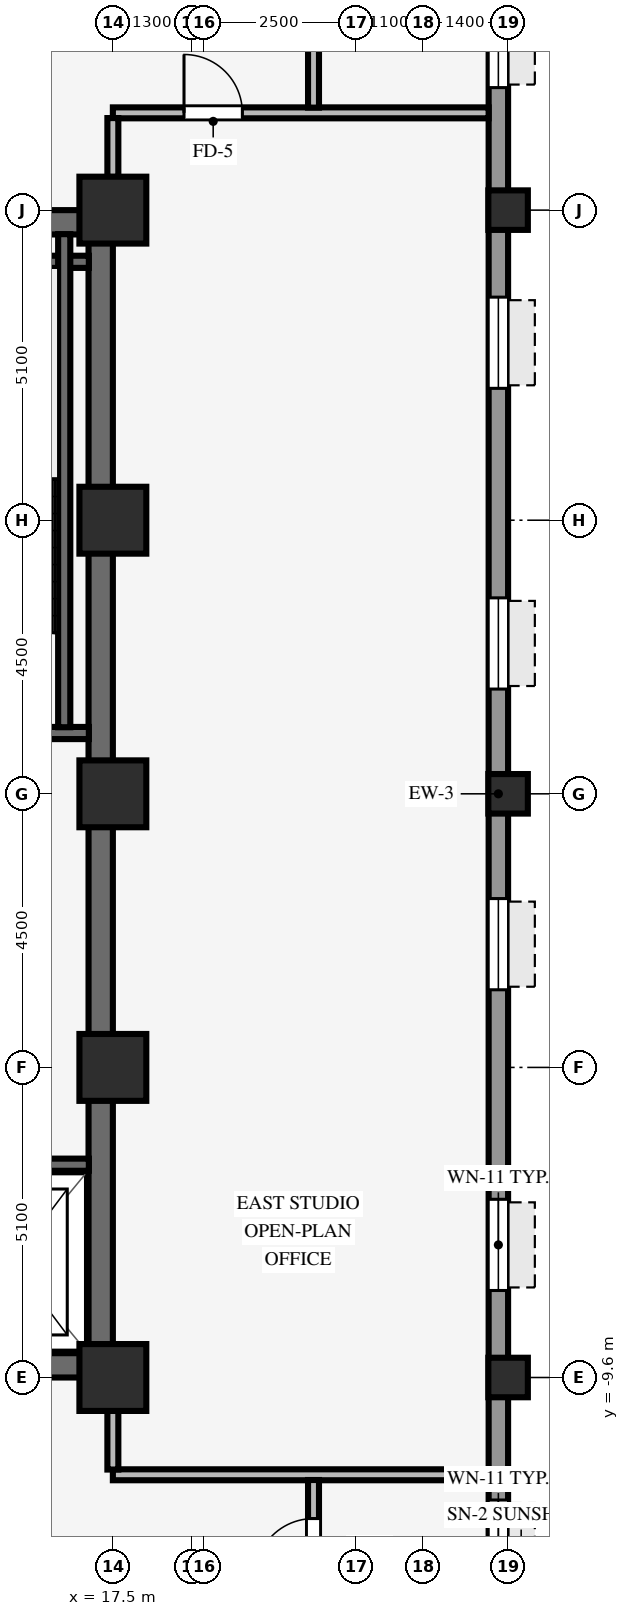
"""IFC4 building model, lengths in metres.
Left out: names, types, materials, properties, quantities, classifications, styles, units other than length and angle.
Written with IfcOpenShell. Run it as: python <this file> out.ifc"""

import sys

from ifc_helpers import new_model, si_unit, direction, frame, frame_2d, origin, origin_2d, place, context, subcontext, project, spatial, rectangle, hollow_rectangle, extrude, source, transform, mapped, element, fill, save


model = new_model("IFC4")
c1 = context("Model", 3, precision=1e-05, world=origin(), true_north=direction((0.0, 1.0)))
c2 = subcontext(c1, "Body", "Model", "MODEL_VIEW")
j1 = project(units=[si_unit("LENGTHUNIT", "METRE"), si_unit("PLANEANGLEUNIT", "RADIAN")], contexts=[c1])
p1 = place(None, origin())
s1 = spatial("IfcSite", under=j1, at=p1, CompositionType="ELEMENT")
p2 = place(p1, origin())
s2 = spatial("IfcBuilding", under=s1, at=p2, CompositionType="ELEMENT")
p3 = place(p2, frame((0.0, 0.0, 98.3)))
s3 = spatial("IfcBuildingStorey", under=s2, at=p3, CompositionType="ELEMENT", Elevation=98.3)
for number, where, z_axis, x_axis in (
    (1, (9.0, -9.4, 0.0), (0.0, 0.0, 1.0), (1.0, 0.0, 0.0)),
    (2, (9.0, 9.4, 0.0), (0.0, 0.0, 1.0), (1.0, 0.0, 0.0)),
):
    element("IfcWall", number, at=place(p3, frame(where, z_axis=z_axis, x_axis=x_axis)), inside=s3, PredefinedType="SHEAR", context=c2, shape_type="SweptSolid", body=[
        extrude(rectangle(XDim=8.5, YDim=0.4, at=frame_2d((4.25, 0.0))), origin(), (0.0, 0.0, 1.0), 3.37),
    ])
p4 = place(p3, frame((17.3, -9.205, 0.0), z_axis=(0.0, 0.0, 1.0), x_axis=(0.0, 1.0, 0.0)))
e3 = element("IfcWall", 3, at=p4, inside=s3, PredefinedType="SHEAR", context=c2, shape_type="SweptSolid", body=[
    extrude(rectangle(XDim=18.41, YDim=0.4, at=frame_2d((9.205, 0.0))), origin(), (0.0, 0.0, 1.0), 3.37),
])
for number, where, z_axis, x_axis in (
    (4, (17.5, -9.6, 0.0), (0.0, 0.0, 1.0), (1.0, 0.0, 0.0)),
    (5, (17.5, -4.5, 0.0), (0.0, 0.0, 1.0), (1.0, 0.0, 0.0)),
    (6, (17.5, 4.5, 0.0), (0.0, 0.0, 1.0), (1.0, 0.0, 0.0)),
    (7, (17.5, 9.6, 0.0), (0.0, 0.0, 1.0), (1.0, 0.0, 0.0)),
    (8, (17.5, 0.0, 0.0), (0.0, 0.0, 1.0), (1.0, 0.0, 0.0)),
):
    element("IfcColumn", number, at=place(p3, frame(where, z_axis=z_axis, x_axis=x_axis)), inside=s3, PredefinedType="COLUMN", context=c2, shape_type="SweptSolid", body=[
        extrude(rectangle(XDim=1.1, YDim=1.1, at=origin_2d()), origin(), (0.0, 0.0, 1.0), 3.37),
    ])
for number, where, z_axis, x_axis in (
    (9, (24.0, -9.6, 0.0), (0.0, 0.0, 1.0), (1.0, 0.0, 0.0)),
    (10, (24.0, 0.0, 0.0), (0.0, 0.0, 1.0), (1.0, 0.0, 0.0)),
    (11, (24.0, 9.6, 0.0), (0.0, 0.0, 1.0), (1.0, 0.0, 0.0)),
):
    element("IfcColumn", number, at=place(p3, frame(where, z_axis=z_axis, x_axis=x_axis)), inside=s3, PredefinedType="COLUMN", context=c2, shape_type="SweptSolid", body=[
        extrude(hollow_rectangle(XDim=0.65, YDim=0.65, WallThickness=0.04, InnerFilletRadius=0.04, OuterFilletRadius=0.08, at=origin_2d()), origin(), (0.0, 0.0, 1.0), 3.37),
    ])
p5 = place(p3, frame((23.84, -20.784, 0.0), z_axis=(0.0, 0.0, 1.0), x_axis=(0.0, 1.0, 0.0)))
e12 = element("IfcWall", 12, at=p5, inside=s3, PredefinedType="STANDARD", context=c2, shape_type="SweptSolid", body=[
    extrude(rectangle(XDim=41.568, YDim=0.32, at=frame_2d((20.784, 0.0))), origin(), (0.0, 0.0, 1.0), 2.705),
])
p6 = place(p5, frame((1.373, 0.0, 0.8)))
e13 = element("IfcOpeningElement", 13, at=p6, cuts=e12, PredefinedType="OPENING", context=c2, shape_type="SweptSolid", body=[
    extrude(rectangle(XDim=1.5, YDim=1.6, at=frame_2d((0.75, 0.8))), frame((0.0, 0.17, 0.0), z_axis=(0.0, -1.0, 0.0), x_axis=(1.0, 0.0, 0.0)), (0.0, 0.0, 1.0), 0.34),
])
p7 = place(p5, frame((7.669, 0.0, 0.8)))
e14 = element("IfcOpeningElement", 14, at=p7, cuts=e12, PredefinedType="OPENING", context=c2, shape_type="SweptSolid", body=[
    extrude(rectangle(XDim=1.5, YDim=1.6, at=frame_2d((0.75, 0.8))), frame((0.0, 0.17, 0.0), z_axis=(0.0, -1.0, 0.0), x_axis=(1.0, 0.0, 0.0)), (0.0, 0.0, 1.0), 0.34),
])
p8 = place(p5, frame((12.615, 0.0, 0.8)))
e15 = element("IfcOpeningElement", 15, at=p8, cuts=e12, PredefinedType="OPENING", context=c2, shape_type="SweptSolid", body=[
    extrude(rectangle(XDim=1.5, YDim=1.6, at=frame_2d((0.75, 0.8))), frame((0.0, 0.17, 0.0), z_axis=(0.0, -1.0, 0.0), x_axis=(1.0, 0.0, 0.0)), (0.0, 0.0, 1.0), 0.34),
])
p9 = place(p5, frame((17.561, 0.0, 0.8)))
e16 = element("IfcOpeningElement", 16, at=p9, cuts=e12, PredefinedType="OPENING", context=c2, shape_type="SweptSolid", body=[
    extrude(rectangle(XDim=1.5, YDim=1.6, at=frame_2d((0.75, 0.8))), frame((0.0, 0.17, 0.0), z_axis=(0.0, -1.0, 0.0), x_axis=(1.0, 0.0, 0.0)), (0.0, 0.0, 1.0), 0.34),
])
p10 = place(p5, frame((22.507, 0.0, 0.8)))
e17 = element("IfcOpeningElement", 17, at=p10, cuts=e12, PredefinedType="OPENING", context=c2, shape_type="SweptSolid", body=[
    extrude(rectangle(XDim=1.5, YDim=1.6, at=frame_2d((0.75, 0.8))), frame((0.0, 0.17, 0.0), z_axis=(0.0, -1.0, 0.0), x_axis=(1.0, 0.0, 0.0)), (0.0, 0.0, 1.0), 0.34),
])
p11 = place(p5, frame((27.453, 0.0, 0.8)))
e18 = element("IfcOpeningElement", 18, at=p11, cuts=e12, PredefinedType="OPENING", context=c2, shape_type="SweptSolid", body=[
    extrude(rectangle(XDim=1.5, YDim=1.6, at=frame_2d((0.75, 0.8))), frame((0.0, 0.17, 0.0), z_axis=(0.0, -1.0, 0.0), x_axis=(1.0, 0.0, 0.0)), (0.0, 0.0, 1.0), 0.34),
])
p12 = place(p5, frame((32.399, 0.0, 0.8)))
e19 = element("IfcOpeningElement", 19, at=p12, cuts=e12, PredefinedType="OPENING", context=c2, shape_type="SweptSolid", body=[
    extrude(rectangle(XDim=1.5, YDim=1.6, at=frame_2d((0.75, 0.8))), frame((0.0, 0.17, 0.0), z_axis=(0.0, -1.0, 0.0), x_axis=(1.0, 0.0, 0.0)), (0.0, 0.0, 1.0), 0.34),
])
p13 = place(p5, frame((38.695, 0.0, 0.8)))
e20 = element("IfcOpeningElement", 20, at=p13, cuts=e12, PredefinedType="OPENING", context=c2, shape_type="SweptSolid", body=[
    extrude(rectangle(XDim=1.5, YDim=1.6, at=frame_2d((0.75, 0.8))), frame((0.0, 0.17, 0.0), z_axis=(0.0, -1.0, 0.0), x_axis=(1.0, 0.0, 0.0)), (0.0, 0.0, 1.0), 0.34),
])
for number, where, z_axis, x_axis in (
    (21, (13.535, 1.0, 0.0), (0.0, 0.0, 1.0), (1.0, 0.0, 0.0)),
    (22, (13.535, 8.75, 0.0), (0.0, 0.0, 1.0), (1.0, 0.0, 0.0)),
):
    element("IfcWall", number, at=place(p3, frame(where, z_axis=z_axis, x_axis=x_axis)), inside=s3, PredefinedType="SHEAR", context=c2, shape_type="SweptSolid", body=[
        extrude(rectangle(XDim=3.57, YDim=0.2, at=frame_2d((1.785, 0.0))), origin(), (0.0, 0.0, 1.0), 3.37),
    ])
p14 = place(p3, frame((16.7, 1.095, 0.0), z_axis=(0.0, 0.0, 1.0), x_axis=(0.0, 1.0, 0.0)))
e23 = element("IfcWall", 23, at=p14, inside=s3, PredefinedType="SHEAR", context=c2, shape_type="SweptSolid", body=[
    extrude(rectangle(XDim=8.11, YDim=0.2, at=frame_2d((4.055, 0.0))), origin(), (0.0, 0.0, 1.0), 3.37),
])
p15 = place(p3, frame((14.645, -6.1, 0.0), z_axis=(0.0, 0.0, 1.0), x_axis=(1.0, 0.0, 0.0)))
e24 = element("IfcWall", 24, at=p15, inside=s3, PredefinedType="SHEAR", context=c2, shape_type="SweptSolid", body=[
    extrude(rectangle(XDim=2.46, YDim=0.2, at=frame_2d((1.23, 0.0))), origin(), (0.0, 0.0, 1.0), 3.37),
])
p16 = place(p3, frame((17.5, -11.2, 0.0), z_axis=(0.0, 0.0, 1.0), x_axis=(1.0, 0.0, 0.0)))
e25 = element("IfcWall", 25, at=p16, inside=s3, PredefinedType="PARTITIONING", context=c2, shape_type="SweptSolid", body=[
    extrude(rectangle(XDim=6.18, YDim=0.18, at=frame_2d((3.09, 0.0))), origin(), (0.0, 0.0, 1.0), 3.36),
])
p17 = place(p3, frame((17.5, 11.2, 0.0), z_axis=(0.0, 0.0, 1.0), x_axis=(1.0, 0.0, 0.0)))
e26 = element("IfcWall", 26, at=p17, inside=s3, PredefinedType="PARTITIONING", context=c2, shape_type="SweptSolid", body=[
    extrude(rectangle(XDim=6.18, YDim=0.18, at=frame_2d((3.09, 0.0))), origin(), (0.0, 0.0, 1.0), 3.36),
])
p18 = place(p17, frame((1.17, 0.0, 0.0)))
e27 = element("IfcOpeningElement", 27, at=p18, cuts=e26, PredefinedType="OPENING", context=c2, shape_type="SweptSolid", body=[
    extrude(rectangle(XDim=0.96, YDim=2.1, at=frame_2d((0.48, 1.05))), frame((0.0, 0.1, 0.0), z_axis=(0.0, -1.0, 0.0), x_axis=(1.0, 0.0, 0.0)), (0.0, 0.0, 1.0), 0.2),
])
for number, where, z_axis, x_axis in (
    (28, (17.5, -11.114, 0.0), (0.0, 0.0, 1.0), (0.0, 1.0, 0.0)),
    (29, (17.5, 10.146, 0.0), (0.0, 0.0, 1.0), (0.0, 1.0, 0.0)),
):
    element("IfcWall", number, at=place(p3, frame(where, z_axis=z_axis, x_axis=x_axis)), inside=s3, PredefinedType="PARTITIONING", context=c2, shape_type="SweptSolid", body=[
        extrude(rectangle(XDim=0.968, YDim=0.18, at=frame_2d((0.484, 0.0))), origin(), (0.0, 0.0, 1.0), 2.738),
    ])
p19 = place(p3, frame((20.8, -13.514, 0.0), z_axis=(0.0, 0.0, 1.0), x_axis=(0.0, 1.0, 0.0)))
e30 = element("IfcWall", 30, at=p19, inside=s3, PredefinedType="PARTITIONING", context=c2, shape_type="SweptSolid", body=[
    extrude(rectangle(XDim=2.228, YDim=0.18, at=frame_2d((1.114, 0.0))), origin(), (0.0, 0.0, 1.0), 3.36),
])
p20 = place(p19, frame((0.634, 0.0, 0.0)))
e31 = element("IfcOpeningElement", 31, at=p20, cuts=e30, PredefinedType="OPENING", context=c2, shape_type="SweptSolid", body=[
    extrude(rectangle(XDim=0.96, YDim=2.1, at=frame_2d((0.48, 1.05))), frame((0.0, 0.1, 0.0), z_axis=(0.0, -1.0, 0.0), x_axis=(1.0, 0.0, 0.0)), (0.0, 0.0, 1.0), 0.2),
])
p21 = place(p3, frame((20.8, 11.286, 0.0), z_axis=(0.0, 0.0, 1.0), x_axis=(0.0, 1.0, 0.0)))
e32 = element("IfcWall", 32, at=p21, inside=s3, PredefinedType="PARTITIONING", context=c2, shape_type="SweptSolid", body=[
    extrude(rectangle(XDim=2.228, YDim=0.18, at=frame_2d((1.114, 0.0))), origin(), (0.0, 0.0, 1.0), 3.36),
])
m1 = source(origin(), c2, "Body", "SweptSolid", [
    extrude(rectangle(XDim=1.5, YDim=1.6, at=frame_2d((0.75, 0.8))), frame((0.0, 0.03, 0.0), z_axis=(0.0, -1.0, 0.0), x_axis=(1.0, 0.0, 0.0)), (0.0, 0.0, 1.0), 0.06),
])
p22 = place(p7, origin())
e33 = element("IfcWindow", 33, at=p22, inside=s3, PartitioningType="SINGLE_PANEL", PredefinedType="WINDOW", context=c2, shape_type="MappedRepresentation", body=[
    mapped(m1, transform((0.0, 0.0, 0.0), scale=1.0)),
])
fill(e14, e33)
p23 = place(p8, origin())
e34 = element("IfcWindow", 34, at=p23, inside=s3, PartitioningType="SINGLE_PANEL", PredefinedType="WINDOW", context=c2, shape_type="MappedRepresentation", body=[
    mapped(m1, transform((0.0, 0.0, 0.0), scale=1.0)),
])
fill(e15, e34)
p24 = place(p9, origin())
e35 = element("IfcWindow", 35, at=p24, inside=s3, PartitioningType="SINGLE_PANEL", PredefinedType="WINDOW", context=c2, shape_type="MappedRepresentation", body=[
    mapped(m1, transform((0.0, 0.0, 0.0), scale=1.0)),
])
fill(e16, e35)
p25 = place(p10, origin())
e36 = element("IfcWindow", 36, at=p25, inside=s3, PartitioningType="SINGLE_PANEL", PredefinedType="WINDOW", context=c2, shape_type="MappedRepresentation", body=[
    mapped(m1, transform((0.0, 0.0, 0.0), scale=1.0)),
])
fill(e17, e36)
p26 = place(p11, origin())
e37 = element("IfcWindow", 37, at=p26, inside=s3, PartitioningType="SINGLE_PANEL", PredefinedType="WINDOW", context=c2, shape_type="MappedRepresentation", body=[
    mapped(m1, transform((0.0, 0.0, 0.0), scale=1.0)),
])
fill(e18, e37)
p27 = place(p12, origin())
e38 = element("IfcWindow", 38, at=p27, inside=s3, PartitioningType="SINGLE_PANEL", PredefinedType="WINDOW", context=c2, shape_type="MappedRepresentation", body=[
    mapped(m1, transform((0.0, 0.0, 0.0), scale=1.0)),
])
fill(e19, e38)
m2 = source(origin(), c2, "Body", "SweptSolid", [
    extrude(rectangle(XDim=0.96, YDim=2.1, at=frame_2d((0.48, 1.05))), frame((0.0, 0.025, 0.0), z_axis=(0.0, -1.0, 0.0), x_axis=(1.0, 0.0, 0.0)), (0.0, 0.0, 1.0), 0.05),
])
p28 = place(p18, origin())
e39 = element("IfcDoor", 39, at=p28, inside=s3, OperationType="SINGLE_SWING_LEFT", PredefinedType="DOOR", context=c2, shape_type="MappedRepresentation", body=[
    mapped(m2, transform((0.0, 0.0, 0.0), scale=1.0)),
])
fill(e27, e39)
p29 = place(p20, origin())
e40 = element("IfcDoor", 40, at=p29, inside=s3, OperationType="SINGLE_SWING_LEFT", PredefinedType="DOOR", context=c2, shape_type="MappedRepresentation", body=[
    mapped(m2, transform((0.0, 0.0, 0.0), scale=1.0)),
])
fill(e31, e40)
save(model, sys.argv[1])
